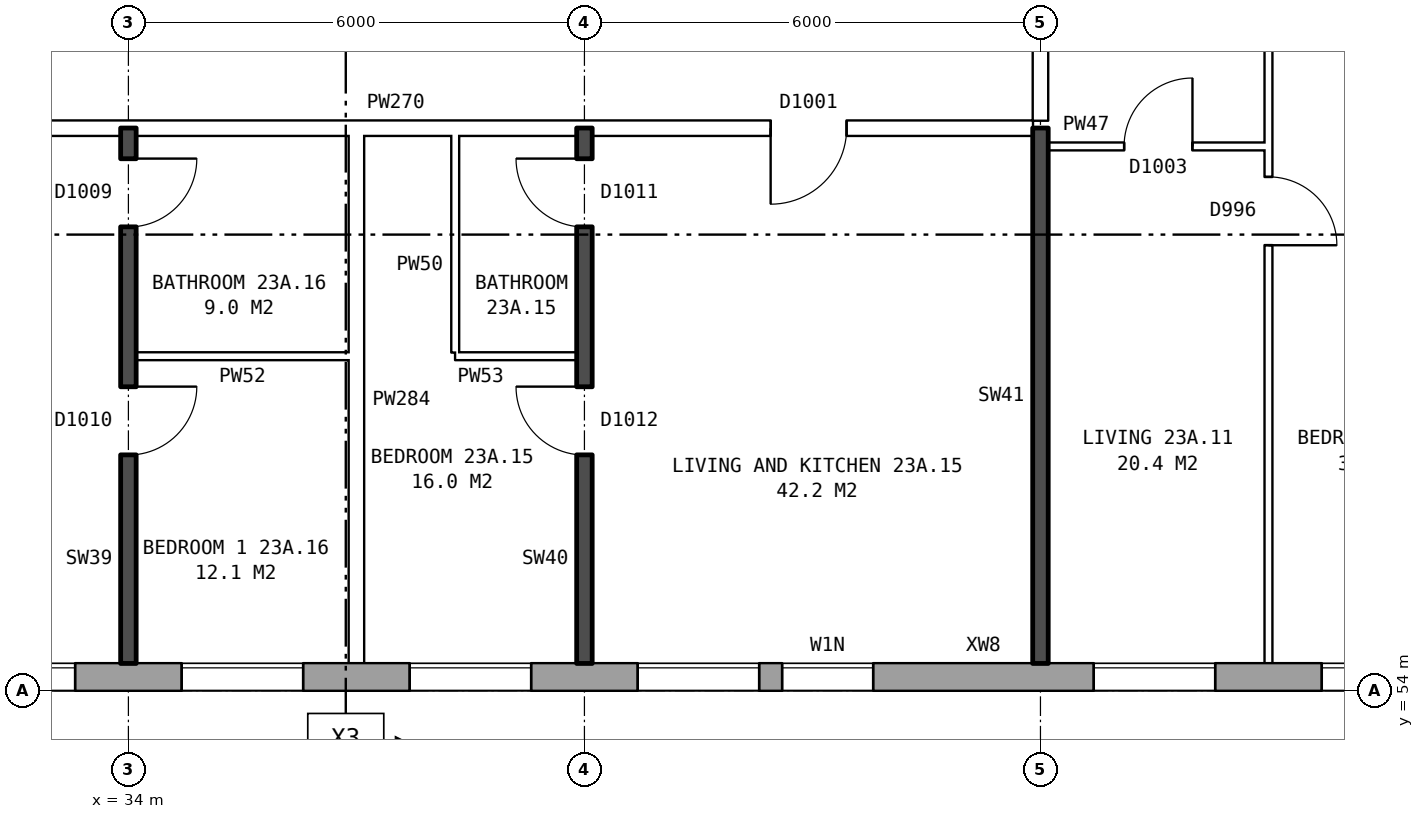
"""IFC4 building model, lengths in metres.
Left out: names, types, materials, properties, quantities, classifications, styles, units other than length and angle.
Written with IfcOpenShell. Run it as: python <this file> out.ifc"""

import sys

from ifc_helpers import new_model, si_unit, direction, frame, frame_2d, origin, place, context, subcontext, project, spatial, rectangle, extrude, element, fill, save


model = new_model("IFC4")
c1 = context("Model", 3, precision=1e-05, world=origin(), true_north=direction((0.0, 1.0)))
c2 = subcontext(c1, "Body", "Model", "MODEL_VIEW")
j1 = project(units=[si_unit("LENGTHUNIT", "METRE"), si_unit("PLANEANGLEUNIT", "RADIAN")], contexts=[c1])
p1 = place(None, origin())
s1 = spatial("IfcSite", under=j1, at=p1, CompositionType="ELEMENT")
p2 = place(p1, origin())
s2 = spatial("IfcBuilding", under=s1, at=p2, CompositionType="ELEMENT")
p3 = place(p2, frame((0.0, 0.0, 84.0)))
s3 = spatial("IfcBuildingStorey", under=s2, at=p3, CompositionType="ELEMENT", Elevation=84.0)
p4 = place(p3, frame((26.325, 54.18, 0.0), z_axis=(0.0, 0.0, 1.0), x_axis=(1.0, 0.0, 0.0)))
e1 = element("IfcWall", 1, at=p4, inside=s3, PredefinedType="STANDARD", context=c2, shape_type="SweptSolid", body=[
    extrude(rectangle(XDim=46.601, YDim=0.36, at=frame_2d((23.3, 0.0))), origin(), (0.0, 0.0, 1.0), 2.85),
])
p5 = place(p4, frame((2.375, 0.0, 0.8)))
e2 = element("IfcOpeningElement", 2, at=p5, cuts=e1, PredefinedType="OPENING", context=c2, shape_type="SweptSolid", body=[
    extrude(rectangle(XDim=1.6, YDim=1.8, at=frame_2d((0.8, 0.9))), frame((0.0, 0.19, 0.0), z_axis=(0.0, -1.0, 0.0), x_axis=(1.0, 0.0, 0.0)), (0.0, 0.0, 1.0), 0.38),
])
p6 = place(p4, frame((5.375, 0.0, 0.8)))
e3 = element("IfcOpeningElement", 3, at=p6, cuts=e1, PredefinedType="OPENING", context=c2, shape_type="SweptSolid", body=[
    extrude(rectangle(XDim=1.6, YDim=1.8, at=frame_2d((0.8, 0.9))), frame((0.0, 0.19, 0.0), z_axis=(0.0, -1.0, 0.0), x_axis=(1.0, 0.0, 0.0)), (0.0, 0.0, 1.0), 0.38),
])
p7 = place(p4, frame((8.375, 0.0, 0.8)))
e4 = element("IfcOpeningElement", 4, at=p7, cuts=e1, PredefinedType="OPENING", context=c2, shape_type="SweptSolid", body=[
    extrude(rectangle(XDim=1.6, YDim=1.8, at=frame_2d((0.8, 0.9))), frame((0.0, 0.19, 0.0), z_axis=(0.0, -1.0, 0.0), x_axis=(1.0, 0.0, 0.0)), (0.0, 0.0, 1.0), 0.38),
])
p8 = place(p4, frame((11.375, 0.0, 0.8)))
e5 = element("IfcOpeningElement", 5, at=p8, cuts=e1, PredefinedType="OPENING", context=c2, shape_type="SweptSolid", body=[
    extrude(rectangle(XDim=1.6, YDim=1.8, at=frame_2d((0.8, 0.9))), frame((0.0, 0.19, 0.0), z_axis=(0.0, -1.0, 0.0), x_axis=(1.0, 0.0, 0.0)), (0.0, 0.0, 1.0), 0.38),
])
p9 = place(p4, frame((14.375, 0.0, 0.8)))
e6 = element("IfcOpeningElement", 6, at=p9, cuts=e1, PredefinedType="OPENING", context=c2, shape_type="SweptSolid", body=[
    extrude(rectangle(XDim=1.6, YDim=1.8, at=frame_2d((0.8, 0.9))), frame((0.0, 0.19, 0.0), z_axis=(0.0, -1.0, 0.0), x_axis=(1.0, 0.0, 0.0)), (0.0, 0.0, 1.0), 0.38),
])
p10 = place(p4, frame((16.275, 0.0, 1.4)))
e7 = element("IfcOpeningElement", 7, at=p10, cuts=e1, PredefinedType="OPENING", context=c2, shape_type="SweptSolid", body=[
    extrude(rectangle(XDim=1.2, YDim=1.2, at=frame_2d((0.6, 0.6))), frame((0.0, 0.19, 0.0), z_axis=(0.0, -1.0, 0.0), x_axis=(1.0, 0.0, 0.0)), (0.0, 0.0, 1.0), 0.38),
])
p11 = place(p4, frame((20.375, 0.0, 0.8)))
e8 = element("IfcOpeningElement", 8, at=p11, cuts=e1, PredefinedType="OPENING", context=c2, shape_type="SweptSolid", body=[
    extrude(rectangle(XDim=1.6, YDim=1.8, at=frame_2d((0.8, 0.9))), frame((0.0, 0.19, 0.0), z_axis=(0.0, -1.0, 0.0), x_axis=(1.0, 0.0, 0.0)), (0.0, 0.0, 1.0), 0.38),
])
p12 = place(p4, frame((23.375, 0.0, 0.8)))
e9 = element("IfcOpeningElement", 9, at=p12, cuts=e1, PredefinedType="OPENING", context=c2, shape_type="SweptSolid", body=[
    extrude(rectangle(XDim=1.6, YDim=1.8, at=frame_2d((0.8, 0.9))), frame((0.0, 0.19, 0.0), z_axis=(0.0, -1.0, 0.0), x_axis=(1.0, 0.0, 0.0)), (0.0, 0.0, 1.0), 0.38),
])
p13 = place(p4, frame((25.875, 0.0, 0.15)))
e10 = element("IfcOpeningElement", 10, at=p13, cuts=e1, PredefinedType="OPENING", context=c2, shape_type="SweptSolid", body=[
    extrude(rectangle(XDim=1.2, YDim=1.8, at=frame_2d((0.6, 0.9))), frame((0.0, 0.19, 0.0), z_axis=(0.0, -1.0, 0.0), x_axis=(1.0, 0.0, 0.0)), (0.0, 0.0, 1.0), 0.38),
])
p14 = place(p4, frame((28.825, 0.0, 1.7)))
e11 = element("IfcOpeningElement", 11, at=p14, cuts=e1, PredefinedType="OPENING", context=c2, shape_type="SweptSolid", body=[
    extrude(rectangle(XDim=0.6, YDim=0.9, at=frame_2d((0.3, 0.45))), frame((0.0, 0.19, 0.0), z_axis=(0.0, -1.0, 0.0), x_axis=(1.0, 0.0, 0.0)), (0.0, 0.0, 1.0), 0.38),
])
p15 = place(p4, frame((32.375, 0.0, 0.8)))
e12 = element("IfcOpeningElement", 12, at=p15, cuts=e1, PredefinedType="OPENING", context=c2, shape_type="SweptSolid", body=[
    extrude(rectangle(XDim=1.6, YDim=1.8, at=frame_2d((0.8, 0.9))), frame((0.0, 0.19, 0.0), z_axis=(0.0, -1.0, 0.0), x_axis=(1.0, 0.0, 0.0)), (0.0, 0.0, 1.0), 0.38),
])
p16 = place(p4, frame((35.375, 0.0, 0.8)))
e13 = element("IfcOpeningElement", 13, at=p16, cuts=e1, PredefinedType="OPENING", context=c2, shape_type="SweptSolid", body=[
    extrude(rectangle(XDim=1.6, YDim=1.8, at=frame_2d((0.8, 0.9))), frame((0.0, 0.19, 0.0), z_axis=(0.0, -1.0, 0.0), x_axis=(1.0, 0.0, 0.0)), (0.0, 0.0, 1.0), 0.38),
])
p17 = place(p4, frame((38.375, 0.0, 0.8)))
e14 = element("IfcOpeningElement", 14, at=p17, cuts=e1, PredefinedType="OPENING", context=c2, shape_type="SweptSolid", body=[
    extrude(rectangle(XDim=1.6, YDim=1.8, at=frame_2d((0.8, 0.9))), frame((0.0, 0.19, 0.0), z_axis=(0.0, -1.0, 0.0), x_axis=(1.0, 0.0, 0.0)), (0.0, 0.0, 1.0), 0.38),
])
p18 = place(p4, frame((41.375, 0.0, 0.8)))
e15 = element("IfcOpeningElement", 15, at=p18, cuts=e1, PredefinedType="OPENING", context=c2, shape_type="SweptSolid", body=[
    extrude(rectangle(XDim=1.6, YDim=1.8, at=frame_2d((0.8, 0.9))), frame((0.0, 0.19, 0.0), z_axis=(0.0, -1.0, 0.0), x_axis=(1.0, 0.0, 0.0)), (0.0, 0.0, 1.0), 0.38),
])
p19 = place(p4, frame((44.375, 0.0, 0.8)))
e16 = element("IfcOpeningElement", 16, at=p19, cuts=e1, PredefinedType="OPENING", context=c2, shape_type="SweptSolid", body=[
    extrude(rectangle(XDim=1.6, YDim=1.8, at=frame_2d((0.8, 0.9))), frame((0.0, 0.19, 0.0), z_axis=(0.0, -1.0, 0.0), x_axis=(1.0, 0.0, 0.0)), (0.0, 0.0, 1.0), 0.38),
])
p20 = place(p4, frame((27.375, 0.0, 0.15)))
e17 = element("IfcOpeningElement", 17, at=p20, cuts=e1, PredefinedType="OPENING", context=c2, shape_type="SweptSolid", body=[
    extrude(rectangle(XDim=0.8, YDim=0.9, at=frame_2d((0.4, 0.45))), frame((0.0, 0.19, 0.0), z_axis=(0.0, -1.0, 0.0), x_axis=(1.0, 0.0, 0.0)), (0.0, 0.0, 1.0), 0.38),
])
p21 = place(p4, frame((29.775, 0.0, 0.8)))
e18 = element("IfcOpeningElement", 18, at=p21, cuts=e1, PredefinedType="OPENING", context=c2, shape_type="SweptSolid", body=[
    extrude(rectangle(XDim=1.6, YDim=1.8, at=frame_2d((0.8, 0.9))), frame((0.0, 0.19, 0.0), z_axis=(0.0, -1.0, 0.0), x_axis=(1.0, 0.0, 0.0)), (0.0, 0.0, 1.0), 0.38),
])
p22 = place(p3, frame((34.1, 58.4, 0.0), z_axis=(0.0, 0.0, 1.0), x_axis=(1.0, 0.0, 0.0)))
e19 = element("IfcWall", 19, at=p22, inside=s3, PredefinedType="PARTITIONING", context=c2, shape_type="SweptSolid", body=[
    extrude(rectangle(XDim=2.8, YDim=0.1, at=frame_2d((1.4, 0.0))), origin(), (0.0, 0.0, 1.0), 2.85),
])
p23 = place(p3, frame((38.3, 58.4, 0.0), z_axis=(0.0, 0.0, 1.0), x_axis=(1.0, 0.0, 0.0)))
e20 = element("IfcWall", 20, at=p23, inside=s3, PredefinedType="PARTITIONING", context=c2, shape_type="SweptSolid", body=[
    extrude(rectangle(XDim=1.6, YDim=0.1, at=frame_2d((0.8, 0.0))), origin(), (0.0, 0.0, 1.0), 2.85),
])
p24 = place(p3, frame((46.1, 61.16, 0.0), z_axis=(0.0, 0.0, 1.0), x_axis=(1.0, 0.0, 0.0)))
e21 = element("IfcWall", 21, at=p24, inside=s3, PredefinedType="PARTITIONING", context=c2, shape_type="SweptSolid", body=[
    extrude(rectangle(XDim=2.9, YDim=0.1, at=frame_2d((1.45, 0.0))), origin(), (0.0, 0.0, 1.0), 2.85),
])
p25 = place(p24, frame((1.0, 0.0, 0.0)))
e22 = element("IfcOpeningElement", 22, at=p25, cuts=e21, PredefinedType="OPENING", context=c2, shape_type="SweptSolid", body=[
    extrude(rectangle(XDim=0.9, YDim=2.1, at=frame_2d((0.45, 1.05))), frame((0.0, 0.06, 0.0), z_axis=(0.0, -1.0, 0.0), x_axis=(1.0, 0.0, 0.0)), (0.0, 0.0, 1.0), 0.12),
])
p26 = place(p3, frame((23.61, 61.4, 0.0), z_axis=(0.0, 0.0, 1.0), x_axis=(1.0, 0.0, 0.0)))
e23 = element("IfcWall", 23, at=p26, inside=s3, PredefinedType="PARTITIONING", context=c2, shape_type="SweptSolid", body=[
    extrude(rectangle(XDim=22.29, YDim=0.2, at=frame_2d((11.145, 0.0))), origin(), (0.0, 0.0, 1.0), 2.85),
])
p27 = place(p26, frame((18.84, 0.0, 0.0)))
e24 = element("IfcOpeningElement", 24, at=p27, cuts=e23, PredefinedType="OPENING", context=c2, shape_type="SweptSolid", body=[
    extrude(rectangle(XDim=1.0, YDim=2.1, at=frame_2d((0.5, 1.05))), frame((0.0, 0.11, 0.0), z_axis=(0.0, -1.0, 0.0), x_axis=(1.0, 0.0, 0.0)), (0.0, 0.0, 1.0), 0.22),
])
p28 = place(p26, frame((6.89, 0.0, 0.0)))
e25 = element("IfcOpeningElement", 25, at=p28, cuts=e23, PredefinedType="OPENING", context=c2, shape_type="SweptSolid", body=[
    extrude(rectangle(XDim=1.0, YDim=2.1, at=frame_2d((0.5, 1.05))), frame((0.0, 0.11, 0.0), z_axis=(0.0, -1.0, 0.0), x_axis=(1.0, 0.0, 0.0)), (0.0, 0.0, 1.0), 0.22),
])
p29 = place(p3, frame((34.0, 54.36, 0.0), z_axis=(0.0, 0.0, 1.0), x_axis=(0.0, 1.0, 0.0)))
e26 = element("IfcWall", 26, at=p29, inside=s3, PredefinedType="SOLIDWALL", context=c2, shape_type="SweptSolid", body=[
    extrude(rectangle(XDim=7.04, YDim=0.2, at=frame_2d((3.52, 0.0))), origin(), (0.0, 0.0, 1.0), 2.85),
])
p30 = place(p29, frame((2.74, 0.0, 0.0)))
e27 = element("IfcOpeningElement", 27, at=p30, cuts=e26, PredefinedType="OPENING", context=c2, shape_type="SweptSolid", body=[
    extrude(rectangle(XDim=0.9, YDim=2.1, at=frame_2d((0.45, 1.05))), frame((0.0, 0.11, 0.0), z_axis=(0.0, -1.0, 0.0), x_axis=(1.0, 0.0, 0.0)), (0.0, 0.0, 1.0), 0.22),
])
p31 = place(p29, frame((5.74, 0.0, 0.0)))
e28 = element("IfcOpeningElement", 28, at=p31, cuts=e26, PredefinedType="OPENING", context=c2, shape_type="SweptSolid", body=[
    extrude(rectangle(XDim=0.9, YDim=2.1, at=frame_2d((0.45, 1.05))), frame((0.0, 0.11, 0.0), z_axis=(0.0, -1.0, 0.0), x_axis=(1.0, 0.0, 0.0)), (0.0, 0.0, 1.0), 0.22),
])
p32 = place(p3, frame((37.0, 54.36, 0.0), z_axis=(0.0, 0.0, 1.0), x_axis=(0.0, 1.0, 0.0)))
e29 = element("IfcWall", 29, at=p32, inside=s3, PredefinedType="PARTITIONING", context=c2, shape_type="SweptSolid", body=[
    extrude(rectangle(XDim=6.94, YDim=0.2, at=frame_2d((3.47, 0.0))), origin(), (0.0, 0.0, 1.0), 2.85),
])
p33 = place(p3, frame((38.3, 58.45, 0.0), z_axis=(0.0, 0.0, 1.0), x_axis=(0.0, 1.0, 0.0)))
e30 = element("IfcWall", 30, at=p33, inside=s3, PredefinedType="PARTITIONING", context=c2, shape_type="SweptSolid", body=[
    extrude(rectangle(XDim=2.85, YDim=0.1, at=frame_2d((1.425, 0.0))), origin(), (0.0, 0.0, 1.0), 2.85),
])
p34 = place(p3, frame((40.0, 54.36, 0.0), z_axis=(0.0, 0.0, 1.0), x_axis=(0.0, 1.0, 0.0)))
e31 = element("IfcWall", 31, at=p34, inside=s3, PredefinedType="SOLIDWALL", context=c2, shape_type="SweptSolid", body=[
    extrude(rectangle(XDim=7.04, YDim=0.2, at=frame_2d((3.52, 0.0))), origin(), (0.0, 0.0, 1.0), 2.85),
])
p35 = place(p34, frame((2.74, 0.0, 0.0)))
e32 = element("IfcOpeningElement", 32, at=p35, cuts=e31, PredefinedType="OPENING", context=c2, shape_type="SweptSolid", body=[
    extrude(rectangle(XDim=0.9, YDim=2.1, at=frame_2d((0.45, 1.05))), frame((0.0, 0.11, 0.0), z_axis=(0.0, -1.0, 0.0), x_axis=(1.0, 0.0, 0.0)), (0.0, 0.0, 1.0), 0.22),
])
p36 = place(p34, frame((5.74, 0.0, 0.0)))
e33 = element("IfcOpeningElement", 33, at=p36, cuts=e31, PredefinedType="OPENING", context=c2, shape_type="SweptSolid", body=[
    extrude(rectangle(XDim=0.9, YDim=2.1, at=frame_2d((0.45, 1.05))), frame((0.0, 0.11, 0.0), z_axis=(0.0, -1.0, 0.0), x_axis=(1.0, 0.0, 0.0)), (0.0, 0.0, 1.0), 0.22),
])
p37 = place(p3, frame((46.0, 54.36, 0.0), z_axis=(0.0, 0.0, 1.0), x_axis=(0.0, 1.0, 0.0)))
e34 = element("IfcWall", 34, at=p37, inside=s3, PredefinedType="SOLIDWALL", context=c2, shape_type="SweptSolid", body=[
    extrude(rectangle(XDim=7.04, YDim=0.2, at=frame_2d((3.52, 0.0))), origin(), (0.0, 0.0, 1.0), 2.85),
])
p38 = place(p3, frame((46.0, 61.5, 0.0), z_axis=(0.0, 0.0, 1.0), x_axis=(0.0, 1.0, 0.0)))
e35 = element("IfcWall", 35, at=p38, inside=s3, PredefinedType="PARTITIONING", context=c2, shape_type="SweptSolid", body=[
    extrude(rectangle(XDim=2.2, YDim=0.2, at=frame_2d((1.1, 0.0))), origin(), (0.0, 0.0, 1.0), 2.85),
])
p39 = place(p3, frame((49.0, 54.36, 0.0), z_axis=(0.0, 0.0, 1.0), x_axis=(0.0, 1.0, 0.0)))
e36 = element("IfcWall", 36, at=p39, inside=s3, PredefinedType="PARTITIONING", context=c2, shape_type="SweptSolid", body=[
    extrude(rectangle(XDim=14.34, YDim=0.1, at=frame_2d((7.17, 0.0))), origin(), (0.0, 0.0, 1.0), 2.85),
])
p40 = place(p39, frame((5.5, 0.0, 0.0)))
e37 = element("IfcOpeningElement", 37, at=p40, cuts=e36, PredefinedType="OPENING", context=c2, shape_type="SweptSolid", body=[
    extrude(rectangle(XDim=0.9, YDim=2.1, at=frame_2d((0.45, 1.05))), frame((0.0, 0.06, 0.0), z_axis=(0.0, -1.0, 0.0), x_axis=(1.0, 0.0, 0.0)), (0.0, 0.0, 1.0), 0.12),
])
p41 = place(p39, frame((13.04, 0.0, 0.0)))
e38 = element("IfcOpeningElement", 38, at=p41, cuts=e36, PredefinedType="OPENING", context=c2, shape_type="SweptSolid", body=[
    extrude(rectangle(XDim=0.9, YDim=2.1, at=frame_2d((0.45, 1.05))), frame((0.0, 0.06, 0.0), z_axis=(0.0, -1.0, 0.0), x_axis=(1.0, 0.0, 0.0)), (0.0, 0.0, 1.0), 0.12),
])
p42 = place(p6, origin())
e39 = element("IfcWindow", 39, at=p42, inside=s3, PartitioningType="SINGLE_PANEL", PredefinedType="WINDOW", context=c2, shape_type="SweptSolid", body=[
    extrude(rectangle(XDim=1.6, YDim=1.8, at=frame_2d((0.8, 0.9))), frame((0.0, 0.15, 0.0), z_axis=(0.0, -1.0, 0.0), x_axis=(1.0, 0.0, 0.0)), (0.0, 0.0, 1.0), 0.06),
])
fill(e3, e39)
p43 = place(p7, origin())
e40 = element("IfcWindow", 40, at=p43, inside=s3, PartitioningType="SINGLE_PANEL", PredefinedType="WINDOW", context=c2, shape_type="SweptSolid", body=[
    extrude(rectangle(XDim=1.6, YDim=1.8, at=frame_2d((0.8, 0.9))), frame((0.0, 0.15, 0.0), z_axis=(0.0, -1.0, 0.0), x_axis=(1.0, 0.0, 0.0)), (0.0, 0.0, 1.0), 0.06),
])
fill(e4, e40)
p44 = place(p8, origin())
e41 = element("IfcWindow", 41, at=p44, inside=s3, PartitioningType="SINGLE_PANEL", PredefinedType="WINDOW", context=c2, shape_type="SweptSolid", body=[
    extrude(rectangle(XDim=1.6, YDim=1.8, at=frame_2d((0.8, 0.9))), frame((0.0, 0.15, 0.0), z_axis=(0.0, -1.0, 0.0), x_axis=(1.0, 0.0, 0.0)), (0.0, 0.0, 1.0), 0.06),
])
fill(e5, e41)
p45 = place(p9, origin())
e42 = element("IfcWindow", 42, at=p45, inside=s3, PartitioningType="SINGLE_PANEL", PredefinedType="WINDOW", context=c2, shape_type="SweptSolid", body=[
    extrude(rectangle(XDim=1.6, YDim=1.8, at=frame_2d((0.8, 0.9))), frame((0.0, 0.15, 0.0), z_axis=(0.0, -1.0, 0.0), x_axis=(1.0, 0.0, 0.0)), (0.0, 0.0, 1.0), 0.06),
])
fill(e6, e42)
p46 = place(p10, origin())
e43 = element("IfcWindow", 43, at=p46, inside=s3, PartitioningType="SINGLE_PANEL", PredefinedType="WINDOW", context=c2, shape_type="SweptSolid", body=[
    extrude(rectangle(XDim=1.2, YDim=1.2, at=frame_2d((0.6, 0.6))), frame((0.0, 0.15, 0.0), z_axis=(0.0, -1.0, 0.0), x_axis=(1.0, 0.0, 0.0)), (0.0, 0.0, 1.0), 0.06),
])
fill(e7, e43)
p47 = place(p11, origin())
e44 = element("IfcWindow", 44, at=p47, inside=s3, PartitioningType="SINGLE_PANEL", PredefinedType="WINDOW", context=c2, shape_type="SweptSolid", body=[
    extrude(rectangle(XDim=1.6, YDim=1.8, at=frame_2d((0.8, 0.9))), frame((0.0, 0.15, 0.0), z_axis=(0.0, -1.0, 0.0), x_axis=(1.0, 0.0, 0.0)), (0.0, 0.0, 1.0), 0.06),
])
fill(e8, e44)
p48 = place(p12, origin())
e45 = element("IfcWindow", 45, at=p48, inside=s3, PartitioningType="SINGLE_PANEL", PredefinedType="WINDOW", context=c2, shape_type="SweptSolid", body=[
    extrude(rectangle(XDim=1.6, YDim=1.8, at=frame_2d((0.8, 0.9))), frame((0.0, 0.15, 0.0), z_axis=(0.0, -1.0, 0.0), x_axis=(1.0, 0.0, 0.0)), (0.0, 0.0, 1.0), 0.06),
])
fill(e9, e45)
p49 = place(p40, frame((0.9, 0.0, 0.0), z_axis=(0.0, 0.0, 1.0), x_axis=(-1.0, 0.0, 0.0)))
e46 = element("IfcDoor", 46, at=p49, inside=s3, OperationType="SINGLE_SWING_RIGHT", PredefinedType="DOOR", context=c2, shape_type="SweptSolid", body=[
    extrude(rectangle(XDim=0.9, YDim=2.1, at=frame_2d((0.45, 1.05))), frame((0.0, 0.025, 0.0), z_axis=(0.0, -1.0, 0.0), x_axis=(1.0, 0.0, 0.0)), (0.0, 0.0, 1.0), 0.05),
])
fill(e37, e46)
p50 = place(p25, origin())
e47 = element("IfcDoor", 47, at=p50, inside=s3, OperationType="SINGLE_SWING_RIGHT", PredefinedType="DOOR", context=c2, shape_type="SweptSolid", body=[
    extrude(rectangle(XDim=0.9, YDim=2.1, at=frame_2d((0.45, 1.05))), frame((0.0, 0.025, 0.0), z_axis=(0.0, -1.0, 0.0), x_axis=(1.0, 0.0, 0.0)), (0.0, 0.0, 1.0), 0.05),
])
fill(e22, e47)
p51 = place(p35, origin())
e48 = element("IfcDoor", 48, at=p51, inside=s3, OperationType="SINGLE_SWING_RIGHT", PredefinedType="DOOR", context=c2, shape_type="SweptSolid", body=[
    extrude(rectangle(XDim=0.9, YDim=2.1, at=frame_2d((0.45, 1.05))), frame((0.0, 0.025, 0.0), z_axis=(0.0, -1.0, 0.0), x_axis=(1.0, 0.0, 0.0)), (0.0, 0.0, 1.0), 0.05),
])
fill(e32, e48)
p52 = place(p27, frame((1.0, 0.0, 0.0), z_axis=(0.0, 0.0, 1.0), x_axis=(-1.0, 0.0, 0.0)))
e49 = element("IfcDoor", 49, at=p52, inside=s3, OperationType="SINGLE_SWING_RIGHT", PredefinedType="DOOR", context=c2, shape_type="SweptSolid", body=[
    extrude(rectangle(XDim=1.0, YDim=2.1, at=frame_2d((0.5, 1.05))), frame((0.0, 0.025, 0.0), z_axis=(0.0, -1.0, 0.0), x_axis=(1.0, 0.0, 0.0)), (0.0, 0.0, 1.0), 0.05),
])
fill(e24, e49)
p53 = place(p36, origin())
e50 = element("IfcDoor", 50, at=p53, inside=s3, OperationType="SINGLE_SWING_RIGHT", PredefinedType="DOOR", context=c2, shape_type="SweptSolid", body=[
    extrude(rectangle(XDim=0.9, YDim=2.1, at=frame_2d((0.45, 1.05))), frame((0.0, 0.025, 0.0), z_axis=(0.0, -1.0, 0.0), x_axis=(1.0, 0.0, 0.0)), (0.0, 0.0, 1.0), 0.05),
])
fill(e33, e50)
p54 = place(p30, frame((0.9, 0.0, 0.0), z_axis=(0.0, 0.0, 1.0), x_axis=(-1.0, 0.0, 0.0)))
e51 = element("IfcDoor", 51, at=p54, inside=s3, OperationType="SINGLE_SWING_LEFT", PredefinedType="DOOR", context=c2, shape_type="SweptSolid", body=[
    extrude(rectangle(XDim=0.9, YDim=2.1, at=frame_2d((0.45, 1.05))), frame((0.0, 0.025, 0.0), z_axis=(0.0, -1.0, 0.0), x_axis=(1.0, 0.0, 0.0)), (0.0, 0.0, 1.0), 0.05),
])
fill(e27, e51)
p55 = place(p31, frame((0.9, 0.0, 0.0), z_axis=(0.0, 0.0, 1.0), x_axis=(-1.0, 0.0, 0.0)))
e52 = element("IfcDoor", 52, at=p55, inside=s3, OperationType="SINGLE_SWING_LEFT", PredefinedType="DOOR", context=c2, shape_type="SweptSolid", body=[
    extrude(rectangle(XDim=0.9, YDim=2.1, at=frame_2d((0.45, 1.05))), frame((0.0, 0.025, 0.0), z_axis=(0.0, -1.0, 0.0), x_axis=(1.0, 0.0, 0.0)), (0.0, 0.0, 1.0), 0.05),
])
fill(e28, e52)
save(model, sys.argv[1])
